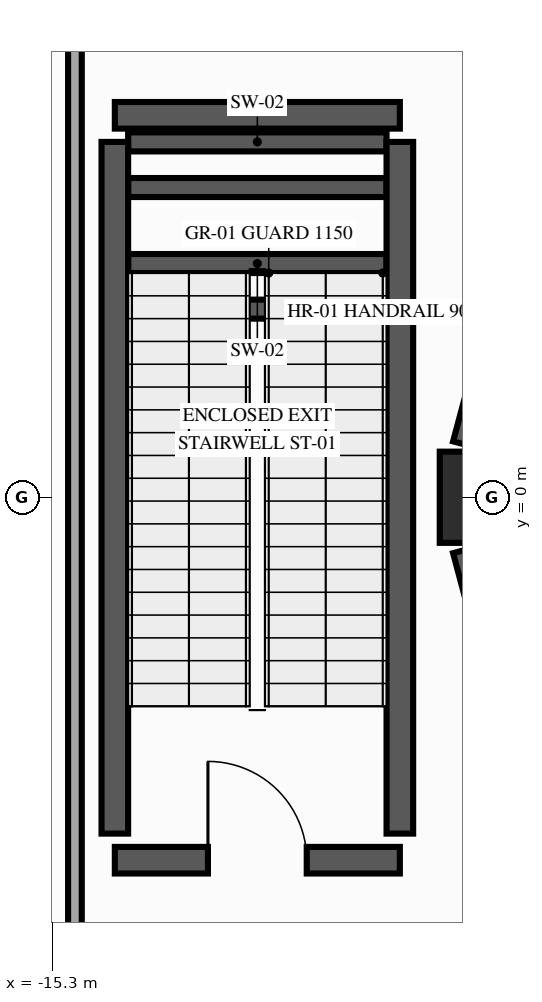
"""IFC4 building model, lengths in metres.
Left out: names, types, materials, properties, quantities, classifications, styles, units other than length and angle.
Written with IfcOpenShell. Run it as: python <this file> out.ifc"""

import sys

from ifc_helpers import new_model, si_unit, direction, frame, frame_2d, origin, origin_2d, place, context, subcontext, project, spatial, rectangle, extrude, element, fill, save


model = new_model("IFC4")
c1 = context("Model", 3, precision=1e-05, world=origin(), true_north=direction((0.0, 1.0)))
c2 = subcontext(c1, "Body", "Model", "MODEL_VIEW")
j1 = project(units=[si_unit("LENGTHUNIT", "METRE"), si_unit("PLANEANGLEUNIT", "RADIAN")], contexts=[c1])
p1 = place(None, origin())
s1 = spatial("IfcSite", under=j1, at=p1, CompositionType="ELEMENT")
p2 = place(p1, origin())
s2 = spatial("IfcBuilding", under=s1, at=p2, CompositionType="ELEMENT")
p3 = place(p2, frame((0.0, 0.0, -6.0)))
s3 = spatial("IfcBuildingStorey", under=s2, at=p3, CompositionType="ELEMENT", Elevation=-6.0)
p4 = place(p3, frame((-9.6, 0.0, 0.0), z_axis=(0.0, 0.0, 1.0), x_axis=(-1.0, 0.0, 0.0)))
e1 = element("IfcColumn", 1, at=p4, inside=s3, PredefinedType="COLUMN", context=c2, shape_type="SweptSolid", body=[
    extrude(rectangle(XDim=1.2, YDim=1.2, at=origin_2d()), origin(), (0.0, 0.0, 1.0), 6.0),
])
for number, where, z_axis, x_axis in (
    (2, (-8.469, 4.22, 0.0), (0.0, 0.0, 1.0), (-0.259, -0.966, 0.0)),
    (3, (-9.445, -0.58, 0.0), (0.0, 0.0, 1.0), (0.259, -0.966, 0.0)),
):
    element("IfcWall", number, at=place(p3, frame(where, z_axis=z_axis, x_axis=x_axis)), inside=s3, PredefinedType="SHEAR", context=c2, shape_type="SweptSolid", body=[
        extrude(rectangle(XDim=3.769, YDim=1.2, at=frame_2d((1.884, 0.0))), origin(), (0.0, 0.0, 1.0), 5.6),
    ])
for number, where, z_axis, x_axis in (
    (4, (-14.3, 3.075, 0.0), (0.0, 0.0, 1.0), (1.0, 0.0, 0.0)),
    (5, (-14.3, 4.675, 0.0), (0.0, 0.0, 1.0), (1.0, 0.0, 0.0)),
):
    element("IfcWall", number, at=place(p3, frame(where, z_axis=z_axis, x_axis=x_axis)), inside=s3, PredefinedType="SHEAR", context=c2, shape_type="SweptSolid", body=[
        extrude(rectangle(XDim=3.4, YDim=0.25, at=frame_2d((1.7, 0.0))), origin(), (0.0, 0.0, 1.0), 2.8),
    ])
for number, where, z_axis, x_axis in (
    (6, (-14.3, 2.475, 0.0), (0.0, 0.0, 1.0), (1.0, 0.0, 0.0)),
    (7, (-14.3, 4.075, 0.0), (0.0, 0.0, 1.0), (1.0, 0.0, 0.0)),
):
    element("IfcWall", number, at=place(p3, frame(where, z_axis=z_axis, x_axis=x_axis)), inside=s3, PredefinedType="SHEAR", context=c2, shape_type="SweptSolid", body=[
        extrude(rectangle(XDim=3.4, YDim=0.25, at=frame_2d((1.7, 0.0))), origin(), (0.0, 0.0, 1.0), 5.7),
    ])
p5 = place(p3, frame((-14.475, -4.775, 0.0), z_axis=(0.0, 0.0, 1.0), x_axis=(1.0, 0.0, 0.0)))
e8 = element("IfcWall", 8, at=p5, inside=s3, PredefinedType="SHEAR", context=c2, shape_type="SweptSolid", body=[
    extrude(rectangle(XDim=3.75, YDim=0.35, at=frame_2d((1.875, 0.0))), origin(), (0.0, 0.0, 1.0), 5.7),
])
p6 = place(p5, frame((1.225, 0.0, 0.0)))
e9 = element("IfcOpeningElement", 9, at=p6, cuts=e8, PredefinedType="OPENING", context=c2, shape_type="SweptSolid", body=[
    extrude(rectangle(XDim=1.3, YDim=2.2, at=frame_2d((0.65, 1.1))), frame((0.0, 0.185, 0.0), z_axis=(0.0, -1.0, 0.0), x_axis=(1.0, 0.0, 0.0)), (0.0, 0.0, 1.0), 0.37),
])
p7 = place(p3, frame((-14.475, 5.025, 0.0), z_axis=(0.0, 0.0, 1.0), x_axis=(1.0, 0.0, 0.0)))
e10 = element("IfcWall", 10, at=p7, inside=s3, PredefinedType="SHEAR", context=c2, shape_type="SweptSolid", body=[
    extrude(rectangle(XDim=3.75, YDim=0.35, at=frame_2d((1.875, 0.0))), origin(), (0.0, 0.0, 1.0), 5.7),
])
for number, where, z_axis, x_axis in (
    (11, (-14.475, -4.425, 0.0), (0.0, 0.0, 1.0), (0.0, 1.0, 0.0)),
    (12, (-10.725, -4.425, 0.0), (0.0, 0.0, 1.0), (0.0, 1.0, 0.0)),
):
    element("IfcWall", number, at=place(p3, frame(where, z_axis=z_axis, x_axis=x_axis)), inside=s3, PredefinedType="SHEAR", context=c2, shape_type="SweptSolid", body=[
        extrude(rectangle(XDim=9.1, YDim=0.35, at=frame_2d((4.55, 0.0))), origin(), (0.0, 0.0, 1.0), 5.7),
    ])
p8 = place(p3, frame((-15.0, -11.3, 0.0), z_axis=(0.0, 0.0, 1.0), x_axis=(0.0, 1.0, 0.0)))
e13 = element("IfcWall", 13, at=p8, inside=s3, PredefinedType="PARTITIONING", context=c2, shape_type="SweptSolid", body=[
    extrude(rectangle(XDim=37.8, YDim=0.18, at=frame_2d((18.9, 0.0))), origin(), (0.0, 0.0, 1.0), 4.735),
])
p9 = place(p8, frame((18.3, 0.0, 0.0)))
e14 = element("IfcOpeningElement", 14, at=p9, cuts=e13, PredefinedType="OPENING", context=c2, shape_type="SweptSolid", body=[
    extrude(rectangle(XDim=1.2, YDim=2.2, at=frame_2d((0.6, 1.1))), frame((0.0, 0.1, 0.0), z_axis=(0.0, -1.0, 0.0), x_axis=(1.0, 0.0, 0.0)), (0.0, 0.0, 1.0), 0.2),
])
p10 = place(p6, origin())
e15 = element("IfcDoor", 15, at=p10, inside=s3, OperationType="SINGLE_SWING_LEFT", PredefinedType="DOOR", context=c2, shape_type="SweptSolid", body=[
    extrude(rectangle(XDim=1.3, YDim=2.2, at=frame_2d((0.65, 1.1))), frame((0.0, 0.025, 0.0), z_axis=(0.0, -1.0, 0.0), x_axis=(1.0, 0.0, 0.0)), (0.0, 0.0, 1.0), 0.05),
])
fill(e9, e15)
save(model, sys.argv[1])
